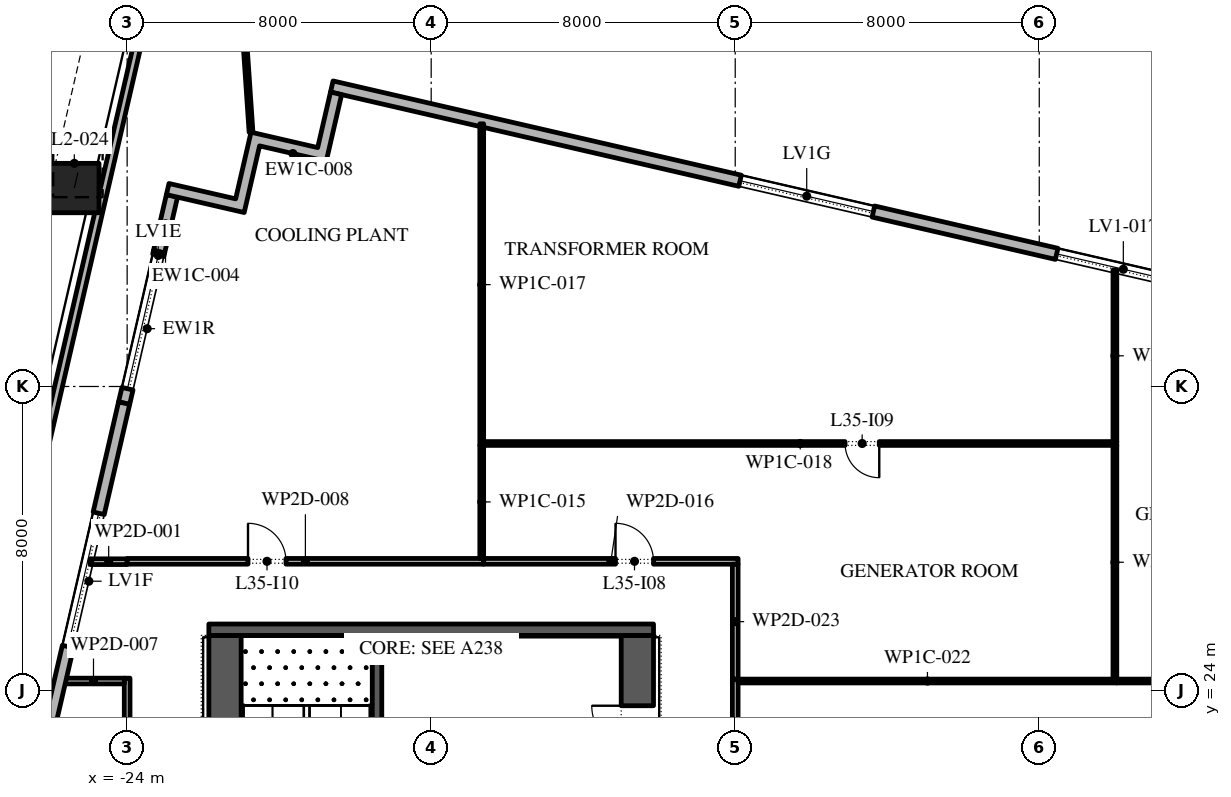
"""IFC4 building model, lengths in metres.
Left out: names, types, materials, properties, quantities, classifications, styles, units other than length and angle.
Written with IfcOpenShell. Run it as: python <this file> out.ifc"""

import sys

from ifc_helpers import new_model, si_unit, direction, frame, frame_2d, origin, origin_2d, place, context, subcontext, project, spatial, polyline, rectangle, outline, extrude, element, fill, save


model = new_model("IFC4")
c1 = context("Model", 3, precision=1e-05, world=origin(), true_north=direction((0.0, 1.0)))
c2 = subcontext(c1, "Body", "Model", "MODEL_VIEW")
j1 = project(units=[si_unit("LENGTHUNIT", "METRE"), si_unit("PLANEANGLEUNIT", "RADIAN")], contexts=[c1])
p1 = place(None, origin())
s1 = spatial("IfcSite", under=j1, at=p1, CompositionType="ELEMENT")
p2 = place(p1, origin())
s2 = spatial("IfcBuilding", under=s1, at=p2, CompositionType="ELEMENT")
p3 = place(p2, frame((0.0, 0.0, 160.2)))
s3 = spatial("IfcBuildingStorey", under=s2, at=p3, CompositionType="ELEMENT", Elevation=160.2)
p4 = place(p3, frame((-25.39, 37.221, 0.0), z_axis=(0.017443366632, 0.07572314197, 0.996976295972), x_axis=(-0.974479105773, 0.22447822258, 0.0)))
e1 = element("IfcColumn", 1, at=p4, inside=s3, PredefinedType="COLUMN", context=c2, shape_type="SweptSolid", body=[
    extrude(rectangle(XDim=1.3, YDim=1.3, at=origin_2d()), origin(), (0.0, 0.0, 1.0), 5.417),
])
p5 = place(p3, frame((31.078, 28.421, 0.0), z_axis=(0.0, 0.0, 1.0), x_axis=(-0.974370456532, 0.224949357493, 0.0)))
e2 = element("IfcWall", 2, at=p5, inside=s3, PredefinedType="STANDARD", context=c2, shape_type="SweptSolid", body=[
    extrude(rectangle(XDim=51.0, YDim=0.3, at=frame_2d((25.5, 0.0))), origin(), (0.0, 0.0, 1.0), 4.95),
])
p6 = place(p5, frame((10.725, 0.0, 0.6)))
e3 = element("IfcOpeningElement", 3, at=p6, cuts=e2, PredefinedType="OPENING", context=c2, shape_type="SweptSolid", body=[
    extrude(rectangle(XDim=3.6, YDim=3.25, at=frame_2d((1.8, 1.625))), frame((0.0, 0.16, 0.0), z_axis=(0.0, -1.0, 0.0), x_axis=(1.0, 0.0, 0.0)), (0.0, 0.0, 1.0), 0.32),
])
p7 = place(p5, frame((19.275, 0.0, 0.6)))
e4 = element("IfcOpeningElement", 4, at=p7, cuts=e2, PredefinedType="OPENING", context=c2, shape_type="SweptSolid", body=[
    extrude(rectangle(XDim=3.6, YDim=3.25, at=frame_2d((1.8, 1.625))), frame((0.0, 0.16, 0.0), z_axis=(0.0, -1.0, 0.0), x_axis=(1.0, 0.0, 0.0)), (0.0, 0.0, 1.0), 0.32),
])
p8 = place(p5, frame((27.825, 0.0, 0.6)))
e5 = element("IfcOpeningElement", 5, at=p8, cuts=e2, PredefinedType="OPENING", context=c2, shape_type="SweptSolid", body=[
    extrude(rectangle(XDim=3.6, YDim=3.9, at=frame_2d((1.8, 1.95))), frame((0.0, 0.16, 0.0), z_axis=(0.0, -1.0, 0.0), x_axis=(1.0, 0.0, 0.0)), (0.0, 0.0, 1.0), 0.32),
])
p9 = place(p5, frame((36.375, 0.0, 0.6)))
e6 = element("IfcOpeningElement", 6, at=p9, cuts=e2, PredefinedType="OPENING", context=c2, shape_type="SweptSolid", body=[
    extrude(rectangle(XDim=3.6, YDim=3.375, at=frame_2d((1.8, 1.688))), frame((0.0, 0.16, 0.0), z_axis=(0.0, -1.0, 0.0), x_axis=(1.0, 0.0, 0.0)), (0.0, 0.0, 1.0), 0.32),
])
p10 = place(p3, frame((-22.82, 37.016, 0.0), z_axis=(0.0, 0.0, 1.0), x_axis=(-0.225001471411, -0.974358423714, 0.0)))
e7 = element("IfcWall", 7, at=p10, inside=s3, PredefinedType="STANDARD", context=c2, shape_type="SweptSolid", body=[
    extrude(rectangle(XDim=1.507, YDim=0.3, at=frame_2d((0.753, 0.0))), origin(), (0.0, 0.0, 1.0), 4.95),
])
p11 = place(p3, origin())
e8 = element("IfcWall", 8, at=p11, inside=s3, PredefinedType="STANDARD", context=c2, shape_type="SweptSolid", body=[
    extrude(outline(polyline([(-22.967, 37.049), (-22.899, 37.342), (-21.145, 36.937), (-20.74, 38.691), (-18.986, 38.286), (-18.649, 39.747), (-18.357, 39.68), (-18.762, 37.926), (-20.515, 38.331), (-20.92, 36.577), (-22.967, 37.049)])), origin(), (0.0, 0.0, 1.0), 4.95),
])
p12 = place(p3, frame((34.5, 35.112, -0.05), z_axis=(0.0, 0.0, 1.0), x_axis=(-0.974370602864, 0.224948723658, 0.0)))
e9 = element("IfcWall", 9, at=p12, inside=s3, PredefinedType="STANDARD", context=c2, shape_type="SweptSolid", body=[
    extrude(rectangle(XDim=54.56, YDim=0.2, at=frame_2d((27.28, 0.0))), origin(), (0.0, 0.0, 1.0), 1.1),
])
p13 = place(p3, frame((-22.904, 44.567, -0.05), z_axis=(0.0, 0.0, 1.0), x_axis=(-0.224953271822, -0.974369552837, 0.0)))
e10 = element("IfcWall", 10, at=p13, inside=s3, PredefinedType="STANDARD", context=c2, shape_type="SweptSolid", body=[
    extrude(rectangle(XDim=58.569, YDim=0.2, at=frame_2d((29.285, 0.0))), origin(), (0.0, 0.0, 1.0), 1.1),
])
p14 = place(p3, frame((-20.74, 38.691, -0.05), z_axis=(0.0, 0.0, 1.0), x_axis=(-0.067684629626, 0.997706765995, 0.0)))
e11 = element("IfcWall", 11, at=p14, inside=s3, PredefinedType="STANDARD", context=c2, shape_type="SweptSolid", body=[
    extrude(rectangle(XDim=7.326, YDim=0.1, at=frame_2d((3.663, 0.0))), origin(), (0.0, 0.0, 1.0), 5.0),
])
p15 = place(p3, frame((-21.425, -2.45, 0.0), z_axis=(0.0, 0.0, 1.0), x_axis=(0.0, 1.0, 0.0)))
e12 = element("IfcWall", 12, at=p15, inside=s3, PredefinedType="SHEAR", context=c2, shape_type="SweptSolid", body=[
    extrude(rectangle(XDim=27.9, YDim=0.85, at=frame_2d((13.95, 0.0))), origin(), (0.0, 0.0, 1.0), 4.95),
])
p16 = place(p15, frame((5.05, 0.0, 0.0)))
e13 = element("IfcOpeningElement", 13, at=p16, cuts=e12, PredefinedType="OPENING", context=c2, shape_type="SweptSolid", body=[
    extrude(rectangle(XDim=1.2, YDim=2.1, at=frame_2d((0.6, 1.05))), frame((0.0, 0.435, 0.0), z_axis=(0.0, -1.0, 0.0), x_axis=(1.0, 0.0, 0.0)), (0.0, 0.0, 1.0), 0.87),
])
p17 = place(p15, frame((21.65, 0.0, 0.0)))
e14 = element("IfcOpeningElement", 14, at=p17, cuts=e12, PredefinedType="OPENING", context=c2, shape_type="SweptSolid", body=[
    extrude(rectangle(XDim=1.2, YDim=2.1, at=frame_2d((0.6, 1.05))), frame((0.0, 0.435, 0.0), z_axis=(0.0, -1.0, 0.0), x_axis=(1.0, 0.0, 0.0)), (0.0, 0.0, 1.0), 0.87),
])
p18 = place(p3, frame((-10.575, -2.45, 0.0), z_axis=(0.0, 0.0, 1.0), x_axis=(0.0, 1.0, 0.0)))
e15 = element("IfcWall", 15, at=p18, inside=s3, PredefinedType="SHEAR", context=c2, shape_type="SweptSolid", body=[
    extrude(rectangle(XDim=27.9, YDim=0.85, at=frame_2d((13.95, 0.0))), origin(), (0.0, 0.0, 1.0), 4.95),
])
p19 = place(p18, frame((23.65, 0.0, 0.0)))
e16 = element("IfcOpeningElement", 16, at=p19, cuts=e15, PredefinedType="OPENING", context=c2, shape_type="SweptSolid", body=[
    extrude(rectangle(XDim=2.4, YDim=2.1, at=frame_2d((1.2, 1.05))), frame((0.0, 0.435, 0.0), z_axis=(0.0, -1.0, 0.0), x_axis=(1.0, 0.0, 0.0)), (0.0, 0.0, 1.0), 0.87),
])
p20 = place(p18, frame((0.337, 0.0, 0.0)))
e17 = element("IfcOpeningElement", 17, at=p20, cuts=e15, PredefinedType="OPENING", context=c2, shape_type="SweptSolid", body=[
    extrude(rectangle(XDim=1.8, YDim=2.4, at=frame_2d((0.9, 1.2))), frame((0.0, 0.435, 0.0), z_axis=(0.0, -1.0, 0.0), x_axis=(1.0, 0.0, 0.0)), (0.0, 0.0, 1.0), 0.87),
])
p21 = place(p18, frame((3.562, 0.0, 0.0)))
e18 = element("IfcOpeningElement", 18, at=p21, cuts=e15, PredefinedType="OPENING", context=c2, shape_type="SweptSolid", body=[
    extrude(rectangle(XDim=1.8, YDim=2.4, at=frame_2d((0.9, 1.2))), frame((0.0, 0.435, 0.0), z_axis=(0.0, -1.0, 0.0), x_axis=(1.0, 0.0, 0.0)), (0.0, 0.0, 1.0), 0.87),
])
p22 = place(p3, frame((-21.85, 25.6, 0.0), z_axis=(0.0, 0.0, 1.0), x_axis=(1.0, 0.0, 0.0)))
e19 = element("IfcWall", 19, at=p22, inside=s3, PredefinedType="SHEAR", context=c2, shape_type="SweptSolid", body=[
    extrude(rectangle(XDim=11.7, YDim=0.3, at=frame_2d((5.85, 0.0))), origin(), (0.0, 0.0, 1.0), 4.95),
])
p23 = place(p3, frame((-17.425, 19.15, 0.0), z_axis=(0.0, 0.0, 1.0), x_axis=(0.0, 1.0, 0.0)))
e20 = element("IfcWall", 20, at=p23, inside=s3, PredefinedType="SHEAR", context=c2, shape_type="SweptSolid", body=[
    extrude(rectangle(XDim=6.3, YDim=0.25, at=frame_2d((3.15, 0.0))), origin(), (0.0, 0.0, 1.0), 4.95),
])
p24 = place(p23, frame((0.05, 0.0, 0.0)))
e21 = element("IfcOpeningElement", 21, at=p24, cuts=e20, PredefinedType="OPENING", context=c2, shape_type="SweptSolid", body=[
    extrude(rectangle(XDim=1.2, YDim=2.1, at=frame_2d((0.6, 1.05))), frame((0.0, 0.135, 0.0), z_axis=(0.0, -1.0, 0.0), x_axis=(1.0, 0.0, 0.0)), (0.0, 0.0, 1.0), 0.27),
])
p25 = place(p3, frame((-24.971, 27.39, 0.0), z_axis=(0.0, 0.0, 1.0), x_axis=(1.0, 0.0, 0.0)))
e22 = element("IfcWall", 22, at=p25, inside=s3, PredefinedType="PARTITIONING", context=c2, shape_type="SweptSolid", body=[
    extrude(rectangle(XDim=0.971, YDim=0.15, at=frame_2d((0.485, 0.0))), origin(), (0.0, 0.0, 1.0), 4.95),
])
p26 = place(p3, frame((-24.0, 2.61, 0.0), z_axis=(0.0, 0.0, 1.0), x_axis=(0.0, 1.0, 0.0)))
e23 = element("IfcWall", 23, at=p26, inside=s3, PredefinedType="PARTITIONING", context=c2, shape_type="SweptSolid", body=[
    extrude(rectangle(XDim=21.715, YDim=0.15, at=frame_2d((10.857, 0.0))), origin(), (0.0, 0.0, 1.0), 4.95),
])
p27 = place(p26, frame((8.24, 0.0, 0.0)))
e24 = element("IfcOpeningElement", 24, at=p27, cuts=e23, PredefinedType="OPENING", context=c2, shape_type="SweptSolid", body=[
    extrude(rectangle(XDim=1.0, YDim=2.1, at=frame_2d((0.5, 1.05))), frame((0.0, 0.085, 0.0), z_axis=(0.0, -1.0, 0.0), x_axis=(1.0, 0.0, 0.0)), (0.0, 0.0, 1.0), 0.17),
])
p28 = place(p3, frame((-24.075, 24.25, 0.0), z_axis=(0.0, 0.0, 1.0), x_axis=(-1.0, 0.0, 0.0)))
e25 = element("IfcWall", 25, at=p28, inside=s3, PredefinedType="PARTITIONING", context=c2, shape_type="SweptSolid", body=[
    extrude(rectangle(XDim=1.621, YDim=0.15, at=frame_2d((0.811, 0.0))), origin(), (0.0, 0.0, 1.0), 4.95),
])
p29 = place(p3, frame((-24.0, 27.4, 0.0), z_axis=(0.0, 0.0, 1.0), x_axis=(1.0, 0.0, 0.0)))
e26 = element("IfcWall", 26, at=p29, inside=s3, PredefinedType="PARTITIONING", context=c2, shape_type="SweptSolid", body=[
    extrude(rectangle(XDim=9.38, YDim=0.15, at=frame_2d((4.69, 0.0))), origin(), (0.0, 0.0, 1.0), 4.95),
])
p30 = place(p29, frame((3.18, 0.0, 0.0)))
e27 = element("IfcOpeningElement", 27, at=p30, cuts=e26, PredefinedType="OPENING", context=c2, shape_type="SweptSolid", body=[
    extrude(rectangle(XDim=1.0, YDim=2.1, at=frame_2d((0.5, 1.05))), frame((0.0, 0.085, 0.0), z_axis=(0.0, -1.0, 0.0), x_axis=(1.0, 0.0, 0.0)), (0.0, 0.0, 1.0), 0.17),
])
p31 = place(p3, frame((-14.67, 27.475, 0.0), z_axis=(0.0, 0.0, 1.0), x_axis=(0.0, 1.0, 0.0)))
e28 = element("IfcWall", 28, at=p31, inside=s3, PredefinedType="PARTITIONING", context=c2, shape_type="SweptSolid", body=[
    extrude(rectangle(XDim=2.975, YDim=0.1, at=frame_2d((1.487, 0.0))), origin(), (0.0, 0.0, 1.0), 4.95),
])
p32 = place(p3, frame((-14.62, 27.4, 0.0), z_axis=(0.0, 0.0, 1.0), x_axis=(1.0, 0.0, 0.0)))
e29 = element("IfcWall", 29, at=p32, inside=s3, PredefinedType="PARTITIONING", context=c2, shape_type="SweptSolid", body=[
    extrude(rectangle(XDim=6.695, YDim=0.15, at=frame_2d((3.348, 0.0))), origin(), (0.0, 0.0, 1.0), 4.95),
])
p33 = place(p32, frame((3.47, 0.0, 0.0)))
e30 = element("IfcOpeningElement", 30, at=p33, cuts=e29, PredefinedType="OPENING", context=c2, shape_type="SweptSolid", body=[
    extrude(rectangle(XDim=1.0, YDim=2.1, at=frame_2d((0.5, 1.05))), frame((0.0, 0.085, 0.0), z_axis=(0.0, -1.0, 0.0), x_axis=(1.0, 0.0, 0.0)), (0.0, 0.0, 1.0), 0.17),
])
p34 = place(p3, frame((-14.67, 30.45, 0.0), z_axis=(0.0, 0.0, 1.0), x_axis=(0.0, 1.0, 0.0)))
e31 = element("IfcWall", 31, at=p34, inside=s3, PredefinedType="PARTITIONING", context=c2, shape_type="SweptSolid", body=[
    extrude(rectangle(XDim=8.461, YDim=0.1, at=frame_2d((4.23, 0.0))), origin(), (0.0, 0.0, 1.0), 4.95),
])
p35 = place(p3, frame((-14.62, 30.5, 0.0), z_axis=(0.0, 0.0, 1.0), x_axis=(1.0, 0.0, 0.0)))
e32 = element("IfcWall", 32, at=p35, inside=s3, PredefinedType="PARTITIONING", context=c2, shape_type="SweptSolid", body=[
    extrude(rectangle(XDim=16.66, YDim=0.1, at=frame_2d((8.33, 0.0))), origin(), (0.0, 0.0, 1.0), 4.95),
])
p36 = place(p35, frame((9.51, 0.0, 0.0)))
e33 = element("IfcOpeningElement", 33, at=p36, cuts=e32, PredefinedType="OPENING", context=c2, shape_type="SweptSolid", body=[
    extrude(rectangle(XDim=0.9, YDim=2.1, at=frame_2d((0.45, 1.05))), frame((0.0, 0.06, 0.0), z_axis=(0.0, -1.0, 0.0), x_axis=(1.0, 0.0, 0.0)), (0.0, 0.0, 1.0), 0.12),
])
p37 = place(p3, frame((-8.0, 24.3, 0.0), z_axis=(0.0, 0.0, 1.0), x_axis=(0.0, -1.0, 0.0)))
e34 = element("IfcWall", 34, at=p37, inside=s3, PredefinedType="PARTITIONING", context=c2, shape_type="SweptSolid", body=[
    extrude(rectangle(XDim=5.225, YDim=0.15, at=frame_2d((2.613, 0.0))), origin(), (0.0, 0.0, 1.0), 4.95),
])
p38 = place(p3, frame((-7.925, 24.25, 0.0), z_axis=(0.0, 0.0, 1.0), x_axis=(1.0, 0.0, 0.0)))
e35 = element("IfcWall", 35, at=p38, inside=s3, PredefinedType="PARTITIONING", context=c2, shape_type="SweptSolid", body=[
    extrude(rectangle(XDim=9.965, YDim=0.1, at=frame_2d((4.982, 0.0))), origin(), (0.0, 0.0, 1.0), 4.95),
])
p39 = place(p3, frame((-8.0, 27.325, 0.0), z_axis=(0.0, 0.0, 1.0), x_axis=(0.0, -1.0, 0.0)))
e36 = element("IfcWall", 36, at=p39, inside=s3, PredefinedType="PARTITIONING", context=c2, shape_type="SweptSolid", body=[
    extrude(rectangle(XDim=3.025, YDim=0.15, at=frame_2d((1.512, 0.0))), origin(), (0.0, 0.0, 1.0), 4.95),
])
p40 = place(p3, frame((1.99, 24.3, 0.0), z_axis=(0.0, 0.0, 1.0), x_axis=(0.0, 1.0, 0.0)))
e37 = element("IfcWall", 37, at=p40, inside=s3, PredefinedType="PARTITIONING", context=c2, shape_type="SweptSolid", body=[
    extrude(rectangle(XDim=6.15, YDim=0.1, at=frame_2d((3.075, 0.0))), origin(), (0.0, 0.0, 1.0), 4.95),
])
p41 = place(p3, frame((2.04, 24.25, 0.0), z_axis=(0.0, 0.0, 1.0), x_axis=(1.0, 0.0, 0.0)))
e38 = element("IfcWall", 38, at=p41, inside=s3, PredefinedType="PARTITIONING", context=c2, shape_type="SweptSolid", body=[
    extrude(rectangle(XDim=6.035, YDim=0.1, at=frame_2d((3.018, 0.0))), origin(), (0.0, 0.0, 1.0), 4.95),
])
p42 = place(p3, frame((1.99, 30.55, 0.0), z_axis=(0.0, 0.0, 1.0), x_axis=(0.0, 1.0, 0.0)))
e39 = element("IfcWall", 39, at=p42, inside=s3, PredefinedType="PARTITIONING", context=c2, shape_type="SweptSolid", body=[
    extrude(rectangle(XDim=4.515, YDim=0.1, at=frame_2d((2.257, 0.0))), origin(), (0.0, 0.0, 1.0), 4.95),
])
p43 = place(p3, frame((-23.159, 35.547, 0.0), z_axis=(0.0, 0.0, 1.0), x_axis=(-0.224981573037, -0.974363018486, 0.0)))
e40 = element("IfcWall", 40, at=p43, inside=s3, PredefinedType="STANDARD", context=c2, shape_type="SweptSolid", body=[
    extrude(rectangle(XDim=4.09, YDim=0.3, at=frame_2d((2.045, 0.0))), origin(), (0.0, 0.0, 1.0), 4.272),
])
p44 = place(p43, frame((0.1, 0.0, 0.6)))
e41 = element("IfcOpeningElement", 41, at=p44, cuts=e40, PredefinedType="OPENING", context=c2, shape_type="SweptSolid", body=[
    extrude(rectangle(XDim=3.6, YDim=3.55, at=frame_2d((1.8, 1.775))), frame((0.0, 0.16, 0.0), z_axis=(0.0, -1.0, 0.0), x_axis=(1.0, 0.0, 0.0)), (0.0, 0.0, 1.0), 0.32),
])
p45 = place(p3, frame((-24.08, 31.562, 0.0), z_axis=(0.0, 0.0, 1.0), x_axis=(-0.224949667351, -0.974370384997, 0.0)))
e42 = element("IfcWall", 42, at=p45, inside=s3, PredefinedType="STANDARD", context=c2, shape_type="SweptSolid", body=[
    extrude(rectangle(XDim=43.903, YDim=0.3, at=frame_2d((21.952, 0.0))), origin(), (0.0, 0.0, 1.0), 4.95),
])
p46 = place(p45, frame((2.974, 0.0, 0.6)))
e43 = element("IfcOpeningElement", 43, at=p46, cuts=e42, PredefinedType="OPENING", context=c2, shape_type="SweptSolid", body=[
    extrude(rectangle(XDim=3.6, YDim=3.475, at=frame_2d((1.8, 1.738))), frame((0.0, 0.16, 0.0), z_axis=(0.0, -1.0, 0.0), x_axis=(1.0, 0.0, 0.0)), (0.0, 0.0, 1.0), 0.32),
])
p47 = place(p45, frame((10.089, 0.0, 0.6)))
e44 = element("IfcOpeningElement", 44, at=p47, cuts=e42, PredefinedType="OPENING", context=c2, shape_type="SweptSolid", body=[
    extrude(rectangle(XDim=3.6, YDim=3.625, at=frame_2d((1.8, 1.812))), frame((0.0, 0.16, 0.0), z_axis=(0.0, -1.0, 0.0), x_axis=(1.0, 0.0, 0.0)), (0.0, 0.0, 1.0), 0.32),
])
p48 = place(p45, frame((17.203, 0.0, 0.6)))
e45 = element("IfcOpeningElement", 45, at=p48, cuts=e42, PredefinedType="OPENING", context=c2, shape_type="SweptSolid", body=[
    extrude(rectangle(XDim=3.6, YDim=3.9, at=frame_2d((1.8, 1.95))), frame((0.0, 0.16, 0.0), z_axis=(0.0, -1.0, 0.0), x_axis=(1.0, 0.0, 0.0)), (0.0, 0.0, 1.0), 0.32),
])
p49 = place(p8, origin())
e46 = element("IfcWindow", 46, at=p49, inside=s3, PartitioningType="DOUBLE_PANEL_HORIZONTAL", PredefinedType="WINDOW", context=c2, shape_type="SweptSolid", body=[
    extrude(rectangle(XDim=3.6, YDim=3.9, at=frame_2d((1.8, 1.95))), frame((0.0, 0.03, 0.0), z_axis=(0.0, -1.0, 0.0), x_axis=(1.0, 0.0, 0.0)), (0.0, 0.0, 1.0), 0.06),
])
fill(e5, e46)
p50 = place(p9, origin())
e47 = element("IfcWindow", 47, at=p50, inside=s3, PartitioningType="DOUBLE_PANEL_HORIZONTAL", PredefinedType="WINDOW", context=c2, shape_type="SweptSolid", body=[
    extrude(rectangle(XDim=3.6, YDim=3.375, at=frame_2d((1.8, 1.688))), frame((0.0, 0.03, 0.0), z_axis=(0.0, -1.0, 0.0), x_axis=(1.0, 0.0, 0.0)), (0.0, 0.0, 1.0), 0.06),
])
fill(e6, e47)
p51 = place(p44, origin())
e48 = element("IfcWindow", 48, at=p51, inside=s3, PartitioningType="DOUBLE_PANEL_HORIZONTAL", PredefinedType="WINDOW", context=c2, shape_type="SweptSolid", body=[
    extrude(rectangle(XDim=3.6, YDim=3.55, at=frame_2d((1.8, 1.775))), frame((0.0, 0.03, 0.0), z_axis=(0.0, -1.0, 0.0), x_axis=(1.0, 0.0, 0.0)), (0.0, 0.0, 1.0), 0.06),
])
fill(e41, e48)
p52 = place(p46, origin())
e49 = element("IfcWindow", 49, at=p52, inside=s3, PartitioningType="DOUBLE_PANEL_HORIZONTAL", PredefinedType="WINDOW", context=c2, shape_type="SweptSolid", body=[
    extrude(rectangle(XDim=3.6, YDim=3.475, at=frame_2d((1.8, 1.738))), frame((0.0, 0.03, 0.0), z_axis=(0.0, -1.0, 0.0), x_axis=(1.0, 0.0, 0.0)), (0.0, 0.0, 1.0), 0.06),
])
fill(e43, e49)
p53 = place(p19, origin())
e50 = element("IfcDoor", 50, at=p53, inside=s3, OperationType="DOUBLE_DOOR_SINGLE_SWING", PredefinedType="DOOR", context=c2, shape_type="SweptSolid", body=[
    extrude(rectangle(XDim=2.4, YDim=2.1, at=frame_2d((1.2, 1.05))), frame((0.0, 0.025, 0.0), z_axis=(0.0, -1.0, 0.0), x_axis=(1.0, 0.0, 0.0)), (0.0, 0.0, 1.0), 0.05),
])
fill(e16, e50)
p54 = place(p33, origin())
e51 = element("IfcDoor", 51, at=p54, inside=s3, OperationType="SINGLE_SWING_RIGHT", PredefinedType="DOOR", context=c2, shape_type="SweptSolid", body=[
    extrude(rectangle(XDim=1.0, YDim=2.1, at=frame_2d((0.5, 1.05))), frame((0.0, 0.025, 0.0), z_axis=(0.0, -1.0, 0.0), x_axis=(1.0, 0.0, 0.0)), (0.0, 0.0, 1.0), 0.05),
])
fill(e30, e51)
p55 = place(p36, frame((0.9, 0.0, 0.0), z_axis=(0.0, 0.0, 1.0), x_axis=(-1.0, 0.0, 0.0)))
e52 = element("IfcDoor", 52, at=p55, inside=s3, OperationType="SINGLE_SWING_RIGHT", PredefinedType="DOOR", context=c2, shape_type="SweptSolid", body=[
    extrude(rectangle(XDim=0.9, YDim=2.1, at=frame_2d((0.45, 1.05))), frame((0.0, 0.025, 0.0), z_axis=(0.0, -1.0, 0.0), x_axis=(1.0, 0.0, 0.0)), (0.0, 0.0, 1.0), 0.05),
])
fill(e33, e52)
p56 = place(p30, origin())
e53 = element("IfcDoor", 53, at=p56, inside=s3, OperationType="SINGLE_SWING_RIGHT", PredefinedType="DOOR", context=c2, shape_type="SweptSolid", body=[
    extrude(rectangle(XDim=1.0, YDim=2.1, at=frame_2d((0.5, 1.05))), frame((0.0, 0.025, 0.0), z_axis=(0.0, -1.0, 0.0), x_axis=(1.0, 0.0, 0.0)), (0.0, 0.0, 1.0), 0.05),
])
fill(e27, e53)
save(model, sys.argv[1])
